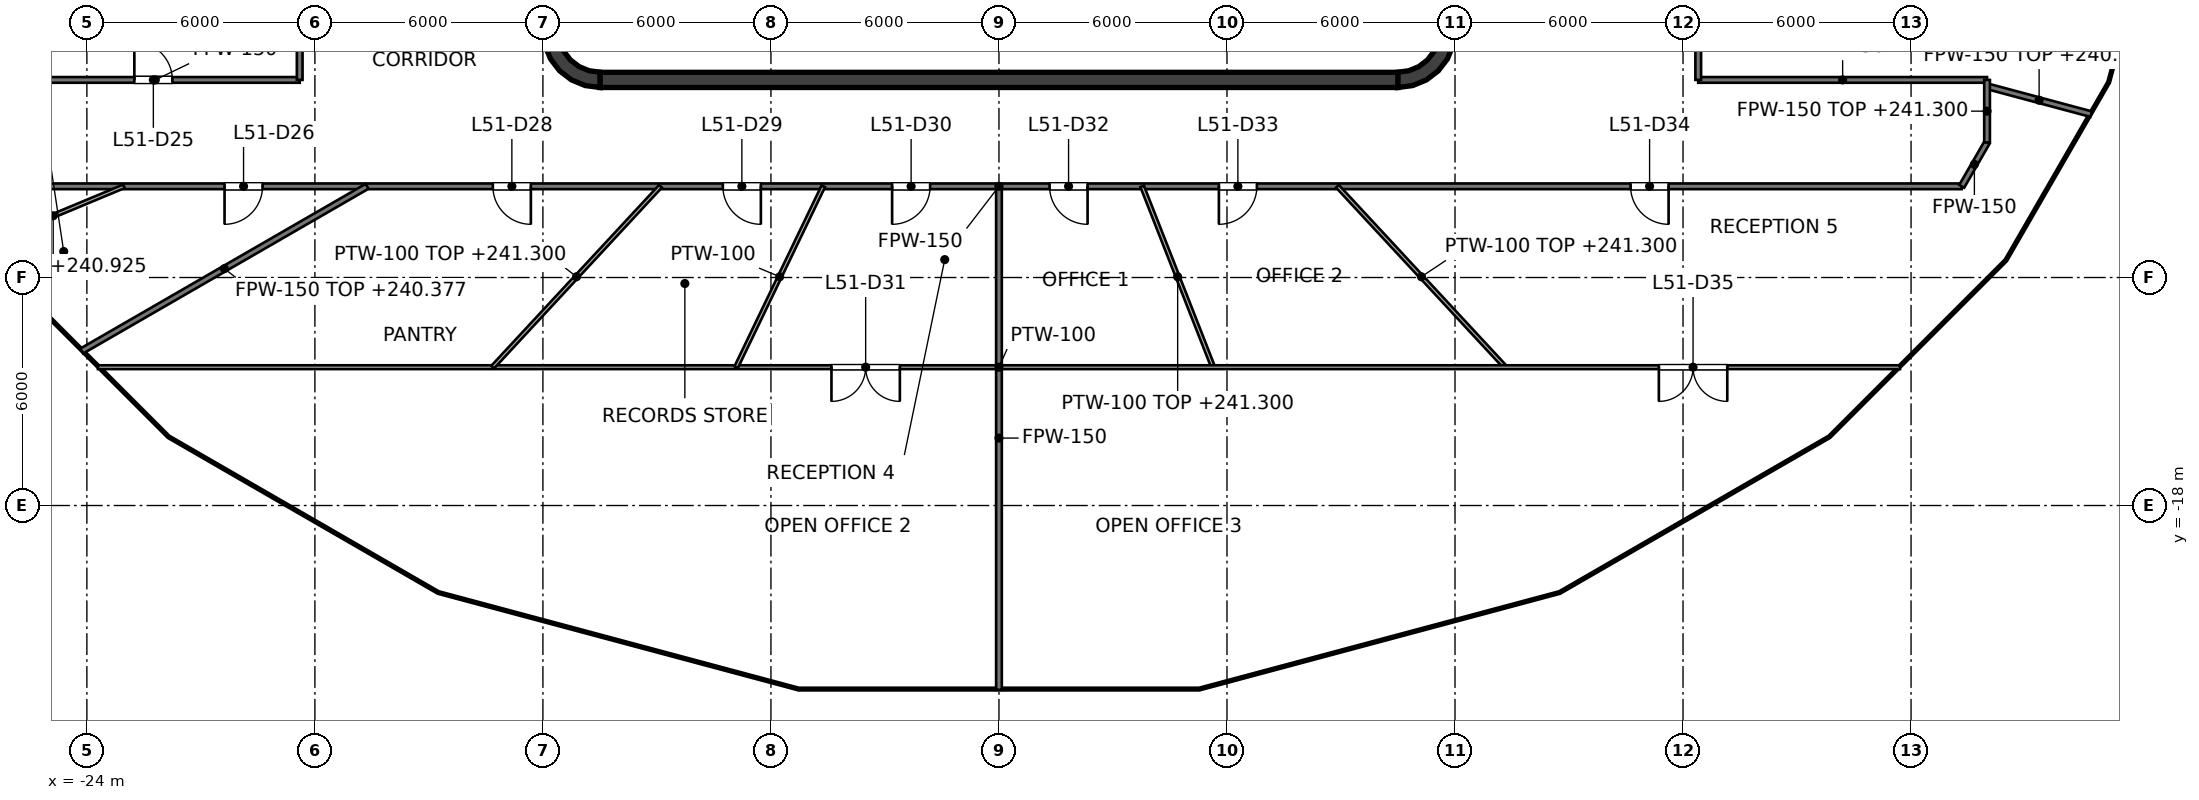
"""IFC4 building model, lengths in metres.
Left out: names, types, materials, properties, quantities, classifications, styles, units other than length and angle.
Written with IfcOpenShell. Run it as: python <this file> out.ifc"""

import sys

from ifc_helpers import new_model, si_unit, direction, frame, frame_2d, origin, place, context, subcontext, project, spatial, polyline, rectangle, outline, extrude, element, fill, save


model = new_model("IFC4")
c1 = context("Model", 3, precision=1e-05, world=origin(), true_north=direction((0.0, 1.0)))
c2 = subcontext(c1, "Body", "Model", "MODEL_VIEW")
j1 = project(units=[si_unit("LENGTHUNIT", "METRE"), si_unit("PLANEANGLEUNIT", "RADIAN")], contexts=[c1])
p1 = place(None, origin())
s1 = spatial("IfcSite", under=j1, at=p1, CompositionType="ELEMENT")
p2 = place(p1, origin())
s2 = spatial("IfcBuilding", under=s1, at=p2, CompositionType="ELEMENT")
p3 = place(p2, frame((0.0, 0.0, 237.6)))
s3 = spatial("IfcBuildingStorey", under=s2, at=p3, CompositionType="ELEMENT", Elevation=237.6)
p4 = place(p3, frame((-10.5, -6.8, 0.0), z_axis=(0.0, 0.0, 1.0), x_axis=(1.0, 0.0, 0.0)))
e1 = element("IfcWall", 1, at=p4, inside=s3, PredefinedType="SHEAR", context=c2, shape_type="SweptSolid", body=[
    extrude(rectangle(XDim=21.0, YDim=0.4, at=frame_2d((10.5, 0.0))), origin(), (0.0, 0.0, 1.0), 4.0),
])
p5 = place(p3, origin())
e2 = element("IfcWall", 2, at=p5, inside=s3, PredefinedType="SHEAR", context=c2, shape_type="SweptSolid", body=[
    extrude(outline(polyline([(-10.5, -7.0), (-10.5, -6.596), (-10.784, -6.559), (-11.048, -6.45), (-11.275, -6.275), (-11.45, -6.048), (-11.559, -5.784), (-11.596, -5.5), (-12.0, -5.5), (-11.949, -5.888), (-11.799, -6.25), (-11.561, -6.561), (-11.25, -6.799), (-10.888, -6.949), (-10.5, -7.0)])), origin(), (0.0, 0.0, 1.0), 4.0),
])
e3 = element("IfcWall", 3, at=p5, inside=s3, PredefinedType="SHEAR", context=c2, shape_type="SweptSolid", body=[
    extrude(outline(polyline([(12.0, -5.5), (11.596, -5.5), (11.559, -5.784), (11.45, -6.048), (11.275, -6.275), (11.048, -6.45), (10.784, -6.559), (10.5, -6.596), (10.5, -7.0), (10.888, -6.949), (11.25, -6.799), (11.561, -6.561), (11.799, -6.25), (11.949, -5.888), (12.0, -5.5)])), origin(), (0.0, 0.0, 1.0), 4.0),
])
p6 = place(p3, frame((0.3, -6.6, 0.0), z_axis=(0.0, 0.0, 1.0), x_axis=(0.0, 1.0, 0.0)))
e4 = element("IfcWall", 4, at=p6, inside=s3, PredefinedType="PARTITIONING", context=c2, shape_type="SweptSolid", body=[
    extrude(rectangle(XDim=2.5, YDim=0.15, at=frame_2d((1.25, 0.0))), origin(), (0.0, 0.0, 1.0), 3.7),
])
p7 = place(p6, frame((0.8, 0.0, 0.0)))
e5 = element("IfcOpeningElement", 5, at=p7, cuts=e4, PredefinedType="OPENING", context=c2, shape_type="SweptSolid", body=[
    extrude(rectangle(XDim=0.9, YDim=2.1, at=frame_2d((0.45, 1.05))), frame((0.0, 0.075, 0.0), z_axis=(0.0, -1.0, 0.0), x_axis=(1.0, 0.0, 0.0)), (0.0, 0.0, 1.0), 0.15),
])
p8 = place(p3, frame((9.0, -6.6, 0.0), z_axis=(0.0, 0.0, 1.0), x_axis=(0.0, 1.0, 0.0)))
e6 = element("IfcWall", 6, at=p8, inside=s3, PredefinedType="SOLIDWALL", context=c2, shape_type="SweptSolid", body=[
    extrude(rectangle(XDim=2.5, YDim=0.25, at=frame_2d((1.25, 0.0))), origin(), (0.0, 0.0, 1.0), 3.85),
])
p9 = place(p8, frame((0.65, 0.0, 0.0)))
e7 = element("IfcOpeningElement", 7, at=p9, cuts=e6, PredefinedType="OPENING", context=c2, shape_type="SweptSolid", body=[
    extrude(rectangle(XDim=1.2, YDim=2.1, at=frame_2d((0.6, 1.05))), frame((0.0, 0.125, 0.0), z_axis=(0.0, -1.0, 0.0), x_axis=(1.0, 0.0, 0.0)), (0.0, 0.0, 1.0), 0.25),
])
p10 = place(p3, frame((-9.0, -6.6, 0.0), z_axis=(0.0, 0.0, 1.0), x_axis=(0.0, 1.0, 0.0)))
e8 = element("IfcWall", 8, at=p10, inside=s3, PredefinedType="PARTITIONING", context=c2, shape_type="SweptSolid", body=[
    extrude(rectangle(XDim=2.5, YDim=0.25, at=frame_2d((1.25, 0.0))), origin(), (0.0, 0.0, 1.0), 3.7),
])
p11 = place(p10, frame((0.75, 0.0, 0.0)))
e9 = element("IfcOpeningElement", 9, at=p11, cuts=e8, PredefinedType="OPENING", context=c2, shape_type="SweptSolid", body=[
    extrude(rectangle(XDim=1.0, YDim=2.1, at=frame_2d((0.5, 1.05))), frame((0.0, 0.125, 0.0), z_axis=(0.0, -1.0, 0.0), x_axis=(1.0, 0.0, 0.0)), (0.0, 0.0, 1.0), 0.25),
])
p12 = place(p3, frame((3.15, -6.6, 0.0), z_axis=(0.0, 0.0, 1.0), x_axis=(0.0, 1.0, 0.0)))
e10 = element("IfcWall", 10, at=p12, inside=s3, PredefinedType="SOLIDWALL", context=c2, shape_type="SweptSolid", body=[
    extrude(rectangle(XDim=2.5, YDim=0.25, at=frame_2d((1.25, 0.0))), origin(), (0.0, 0.0, 1.0), 3.85),
])
p13 = place(p3, frame((-2.9, -6.6, 0.0), z_axis=(0.0, 0.0, 1.0), x_axis=(0.0, 1.0, 0.0)))
e11 = element("IfcWall", 11, at=p13, inside=s3, PredefinedType="PARTITIONING", context=c2, shape_type="SweptSolid", body=[
    extrude(rectangle(XDim=2.5, YDim=0.25, at=frame_2d((1.25, 0.0))), origin(), (0.0, 0.0, 1.0), 3.7),
])
p14 = place(p13, frame((0.8, 0.0, 0.0)))
e12 = element("IfcOpeningElement", 12, at=p14, cuts=e11, PredefinedType="OPENING", context=c2, shape_type="SweptSolid", body=[
    extrude(rectangle(XDim=0.9, YDim=2.1, at=frame_2d((0.45, 1.05))), frame((0.0, 0.125, 0.0), z_axis=(0.0, -1.0, 0.0), x_axis=(1.0, 0.0, 0.0)), (0.0, 0.0, 1.0), 0.25),
])
p15 = place(p3, frame((26.0, -6.967, 0.0), z_axis=(0.0, 0.0, 1.0), x_axis=(0.965928451997, -0.258809245628, 0.0)))
e13 = element("IfcWall", 13, at=p15, inside=s3, PredefinedType="PARTITIONING", context=c2, shape_type="SweptSolid", body=[
    extrude(rectangle(XDim=2.836, YDim=0.15, at=frame_2d((1.418, 0.0))), origin(), (0.0, 0.0, 1.0), 3.325),
])
p16 = place(p3, frame((-25.333, -9.6, 0.0), z_axis=(0.0, 0.0, 1.0), x_axis=(1.0, 0.0, 0.0)))
e14 = element("IfcWall", 14, at=p16, inside=s3, PredefinedType="PARTITIONING", context=c2, shape_type="SweptSolid", body=[
    extrude(rectangle(XDim=50.666, YDim=0.15, at=frame_2d((25.333, 0.0))), origin(), (0.0, 0.0, 1.0), 2.768),
])
p17 = place(p16, frame((4.956, 0.0, 0.0)))
e15 = element("IfcOpeningElement", 15, at=p17, cuts=e14, PredefinedType="OPENING", context=c2, shape_type="SweptSolid", body=[
    extrude(rectangle(XDim=1.0, YDim=2.1, at=frame_2d((0.5, 1.05))), frame((0.0, 0.075, 0.0), z_axis=(0.0, -1.0, 0.0), x_axis=(1.0, 0.0, 0.0)), (0.0, 0.0, 1.0), 0.15),
])
p18 = place(p16, frame((12.016, 0.0, 0.0)))
e16 = element("IfcOpeningElement", 16, at=p18, cuts=e14, PredefinedType="OPENING", context=c2, shape_type="SweptSolid", body=[
    extrude(rectangle(XDim=1.0, YDim=2.1, at=frame_2d((0.5, 1.05))), frame((0.0, 0.075, 0.0), z_axis=(0.0, -1.0, 0.0), x_axis=(1.0, 0.0, 0.0)), (0.0, 0.0, 1.0), 0.15),
])
p19 = place(p16, frame((18.068, 0.0, 0.0)))
e17 = element("IfcOpeningElement", 17, at=p19, cuts=e14, PredefinedType="OPENING", context=c2, shape_type="SweptSolid", body=[
    extrude(rectangle(XDim=1.0, YDim=2.1, at=frame_2d((0.5, 1.05))), frame((0.0, 0.075, 0.0), z_axis=(0.0, -1.0, 0.0), x_axis=(1.0, 0.0, 0.0)), (0.0, 0.0, 1.0), 0.15),
])
p20 = place(p16, frame((22.521, 0.0, 0.0)))
e18 = element("IfcOpeningElement", 18, at=p20, cuts=e14, PredefinedType="OPENING", context=c2, shape_type="SweptSolid", body=[
    extrude(rectangle(XDim=1.0, YDim=2.1, at=frame_2d((0.5, 1.05))), frame((0.0, 0.075, 0.0), z_axis=(0.0, -1.0, 0.0), x_axis=(1.0, 0.0, 0.0)), (0.0, 0.0, 1.0), 0.15),
])
p21 = place(p16, frame((26.665, 0.0, 0.0)))
e19 = element("IfcOpeningElement", 19, at=p21, cuts=e14, PredefinedType="OPENING", context=c2, shape_type="SweptSolid", body=[
    extrude(rectangle(XDim=1.0, YDim=2.1, at=frame_2d((0.5, 1.05))), frame((0.0, 0.075, 0.0), z_axis=(0.0, -1.0, 0.0), x_axis=(1.0, 0.0, 0.0)), (0.0, 0.0, 1.0), 0.15),
])
p22 = place(p16, frame((31.12, 0.0, 0.0)))
e20 = element("IfcOpeningElement", 20, at=p22, cuts=e14, PredefinedType="OPENING", context=c2, shape_type="SweptSolid", body=[
    extrude(rectangle(XDim=1.0, YDim=2.1, at=frame_2d((0.5, 1.05))), frame((0.0, 0.075, 0.0), z_axis=(0.0, -1.0, 0.0), x_axis=(1.0, 0.0, 0.0)), (0.0, 0.0, 1.0), 0.15),
])
p23 = place(p16, frame((41.953, 0.0, 0.0)))
e21 = element("IfcOpeningElement", 21, at=p23, cuts=e14, PredefinedType="OPENING", context=c2, shape_type="SweptSolid", body=[
    extrude(rectangle(XDim=1.0, YDim=2.1, at=frame_2d((0.5, 1.05))), frame((0.0, 0.075, 0.0), z_axis=(0.0, -1.0, 0.0), x_axis=(1.0, 0.0, 0.0)), (0.0, 0.0, 1.0), 0.15),
])
p24 = place(p3, frame((-26.0, -6.8, 0.0), z_axis=(0.0, 0.0, 1.0), x_axis=(1.0, 0.0, 0.0)))
e22 = element("IfcWall", 22, at=p24, inside=s3, PredefinedType="PARTITIONING", context=c2, shape_type="SweptSolid", body=[
    extrude(rectangle(XDim=7.6, YDim=0.15, at=frame_2d((3.8, 0.0))), origin(), (0.0, 0.0, 1.0), 2.768),
])
p25 = place(p24, frame((3.249, 0.0, 0.0)))
e23 = element("IfcOpeningElement", 23, at=p25, cuts=e22, PredefinedType="OPENING", context=c2, shape_type="SweptSolid", body=[
    extrude(rectangle(XDim=1.0, YDim=2.1, at=frame_2d((0.5, 1.05))), frame((0.0, 0.075, 0.0), z_axis=(0.0, -1.0, 0.0), x_axis=(1.0, 0.0, 0.0)), (0.0, 0.0, 1.0), 0.15),
])
p26 = place(p3, frame((18.4, -6.8, 0.0), z_axis=(0.0, 0.0, 1.0), x_axis=(1.0, 0.0, 0.0)))
e24 = element("IfcWall", 24, at=p26, inside=s3, PredefinedType="PARTITIONING", context=c2, shape_type="SweptSolid", body=[
    extrude(rectangle(XDim=7.6, YDim=0.15, at=frame_2d((3.8, 0.0))), origin(), (0.0, 0.0, 1.0), 2.768),
])
p27 = place(p3, frame((-24.135, -13.935, 0.0), z_axis=(0.0, 0.0, 1.0), x_axis=(0.866016292776, 0.500015780397, 0.0)))
e25 = element("IfcWall", 25, at=p27, inside=s3, PredefinedType="PARTITIONING", context=c2, shape_type="SweptSolid", body=[
    extrude(rectangle(XDim=8.67, YDim=0.15, at=frame_2d((4.335, 0.0))), origin(), (0.0, 0.0, 1.0), 2.777),
])
p28 = place(p3, frame((25.333, -9.6, 0.0), z_axis=(0.0, 0.0, 1.0), x_axis=(0.500076310463, 0.865981341435, 0.0)))
e26 = element("IfcWall", 26, at=p28, inside=s3, PredefinedType="PARTITIONING", context=c2, shape_type="SweptSolid", body=[
    extrude(rectangle(XDim=1.334, YDim=0.15, at=frame_2d((0.667, 0.0))), origin(), (0.0, 0.0, 1.0), 2.768),
])
p29 = place(p3, frame((26.0, -8.445, 0.0), z_axis=(0.0, 0.0, 1.0), x_axis=(0.0, 1.0, 0.0)))
e27 = element("IfcWall", 27, at=p29, inside=s3, PredefinedType="PARTITIONING", context=c2, shape_type="SweptSolid", body=[
    extrude(rectangle(XDim=1.645, YDim=0.15, at=frame_2d((0.823, 0.0))), origin(), (0.0, 0.0, 1.0), 3.7),
])
p30 = place(p3, frame((18.4, -6.8, 0.0), z_axis=(0.0, 0.0, 1.0), x_axis=(0.0, 1.0, 0.0)))
e28 = element("IfcWall", 28, at=p30, inside=s3, PredefinedType="PARTITIONING", context=c2, shape_type="SweptSolid", body=[
    extrude(rectangle(XDim=13.6, YDim=0.15, at=frame_2d((6.8, 0.0))), origin(), (0.0, 0.0, 1.0), 2.768),
])
p31 = place(p30, frame((6.2, 0.0, 0.0)))
e29 = element("IfcOpeningElement", 29, at=p31, cuts=e28, PredefinedType="OPENING", context=c2, shape_type="SweptSolid", body=[
    extrude(rectangle(XDim=1.2, YDim=2.1, at=frame_2d((0.6, 1.05))), frame((0.0, 0.075, 0.0), z_axis=(0.0, -1.0, 0.0), x_axis=(1.0, 0.0, 0.0)), (0.0, 0.0, 1.0), 0.15),
])
p32 = place(p3, frame((0.0, -22.85, 0.0), z_axis=(0.0, 0.0, 1.0), x_axis=(0.0, 1.0, 0.0)))
e30 = element("IfcWall", 30, at=p32, inside=s3, PredefinedType="PARTITIONING", context=c2, shape_type="SweptSolid", body=[
    extrude(rectangle(XDim=13.25, YDim=0.15, at=frame_2d((6.625, 0.0))), origin(), (0.0, 0.0, 1.0), 2.768),
])
p33 = place(p3, frame((-18.4, -6.8, 0.0), z_axis=(0.0, 0.0, 1.0), x_axis=(0.0, 1.0, 0.0)))
e31 = element("IfcWall", 31, at=p33, inside=s3, PredefinedType="PARTITIONING", context=c2, shape_type="SweptSolid", body=[
    extrude(rectangle(XDim=13.6, YDim=0.15, at=frame_2d((6.8, 0.0))), origin(), (0.0, 0.0, 1.0), 2.768),
])
p34 = place(p3, frame((3.768, -9.6, 0.0), z_axis=(0.0, 0.0, 1.0), x_axis=(0.365299294679, -0.93089012526, 0.0)))
e32 = element("IfcWall", 32, at=p34, inside=s3, PredefinedType="PARTITIONING", context=c2, shape_type="SweptSolid", body=[
    extrude(rectangle(XDim=5.113, YDim=0.1, at=frame_2d((2.557, 0.0))), origin(), (0.0, 0.0, 1.0), 3.7),
])
p35 = place(p3, frame((8.907, -9.6, 0.0), z_axis=(0.0, 0.0, 1.0), x_axis=(0.680201581888, -0.733025107344, 0.0)))
e33 = element("IfcWall", 33, at=p35, inside=s3, PredefinedType="PARTITIONING", context=c2, shape_type="SweptSolid", body=[
    extrude(rectangle(XDim=6.494, YDim=0.1, at=frame_2d((3.247, 0.0))), origin(), (0.0, 0.0, 1.0), 3.7),
])
p36 = place(p3, frame((-23.71, -14.36, 0.0), z_axis=(0.0, 0.0, 1.0), x_axis=(1.0, 0.0, 0.0)))
e34 = element("IfcWall", 34, at=p36, inside=s3, PredefinedType="PARTITIONING", context=c2, shape_type="SweptSolid", body=[
    extrude(rectangle(XDim=47.42, YDim=0.1, at=frame_2d((23.71, 0.0))), origin(), (0.0, 0.0, 1.0), 2.768),
])
p37 = place(p36, frame((19.302, 0.0, 0.0)))
e35 = element("IfcOpeningElement", 35, at=p37, cuts=e34, PredefinedType="OPENING", context=c2, shape_type="SweptSolid", body=[
    extrude(rectangle(XDim=1.8, YDim=2.1, at=frame_2d((0.9, 1.05))), frame((0.0, 0.05, 0.0), z_axis=(0.0, -1.0, 0.0), x_axis=(1.0, 0.0, 0.0)), (0.0, 0.0, 1.0), 0.1),
])
p38 = place(p36, frame((41.074, 0.0, 0.0)))
e36 = element("IfcOpeningElement", 36, at=p38, cuts=e34, PredefinedType="OPENING", context=c2, shape_type="SweptSolid", body=[
    extrude(rectangle(XDim=1.8, YDim=2.1, at=frame_2d((0.9, 1.05))), frame((0.0, 0.05, 0.0), z_axis=(0.0, -1.0, 0.0), x_axis=(1.0, 0.0, 0.0)), (0.0, 0.0, 1.0), 0.1),
])
p39 = place(p3, frame((-29.149, -6.991, 0.0), z_axis=(0.0, 0.0, 1.0), x_axis=(0.97242598182, 0.233211727583, 0.0)))
e37 = element("IfcWall", 37, at=p39, inside=s3, PredefinedType="PARTITIONING", context=c2, shape_type="SweptSolid", body=[
    extrude(rectangle(XDim=11.054, YDim=0.1, at=frame_2d((5.527, 0.0))), origin(), (0.0, 0.0, 1.0), 2.768),
])
p40 = place(p3, frame((-26.747, -11.152, 0.0), z_axis=(0.0, 0.0, 1.0), x_axis=(0.922980174508, 0.384847498973, 0.0)))
e38 = element("IfcWall", 38, at=p40, inside=s3, PredefinedType="PARTITIONING", context=c2, shape_type="SweptSolid", body=[
    extrude(rectangle(XDim=4.033, YDim=0.1, at=frame_2d((2.016, 0.0))), origin(), (0.0, 0.0, 1.0), 3.325),
])
p41 = place(p3, frame((-13.324, -14.36, 0.0), z_axis=(0.0, 0.0, 1.0), x_axis=(0.680201581888, 0.733025107344, 0.0)))
e39 = element("IfcWall", 39, at=p41, inside=s3, PredefinedType="PARTITIONING", context=c2, shape_type="SweptSolid", body=[
    extrude(rectangle(XDim=6.494, YDim=0.1, at=frame_2d((3.247, 0.0))), origin(), (0.0, 0.0, 1.0), 3.7),
])
p42 = place(p3, frame((-6.915, -14.36, 0.0), z_axis=(0.0, 0.0, 1.0), x_axis=(0.433836460285, 0.90099163466, 0.0)))
e40 = element("IfcWall", 40, at=p42, inside=s3, PredefinedType="PARTITIONING", context=c2, shape_type="SweptSolid", body=[
    extrude(rectangle(XDim=5.283, YDim=0.1, at=frame_2d((2.642, 0.0))), origin(), (0.0, 0.0, 1.0), 2.768),
])
p43 = place(p25, origin())
e41 = element("IfcDoor", 41, at=p43, inside=s3, OperationType="SINGLE_SWING_LEFT", PredefinedType="DOOR", context=c2, shape_type="SweptSolid", body=[
    extrude(rectangle(XDim=1.0, YDim=2.1, at=frame_2d((0.5, 1.05))), frame((0.0, 0.025, 0.0), z_axis=(0.0, -1.0, 0.0), x_axis=(1.0, 0.0, 0.0)), (0.0, 0.0, 1.0), 0.05),
])
fill(e23, e41)
p44 = place(p17, origin())
e42 = element("IfcDoor", 42, at=p44, inside=s3, OperationType="SINGLE_SWING_LEFT", PredefinedType="DOOR", context=c2, shape_type="SweptSolid", body=[
    extrude(rectangle(XDim=1.0, YDim=2.1, at=frame_2d((0.5, 1.05))), frame((0.0, 0.025, 0.0), z_axis=(0.0, -1.0, 0.0), x_axis=(1.0, 0.0, 0.0)), (0.0, 0.0, 1.0), 0.05),
])
fill(e15, e42)
p45 = place(p18, origin())
e43 = element("IfcDoor", 43, at=p45, inside=s3, OperationType="SINGLE_SWING_RIGHT", PredefinedType="DOOR", context=c2, shape_type="SweptSolid", body=[
    extrude(rectangle(XDim=1.0, YDim=2.1, at=frame_2d((0.5, 1.05))), frame((0.0, 0.025, 0.0), z_axis=(0.0, -1.0, 0.0), x_axis=(1.0, 0.0, 0.0)), (0.0, 0.0, 1.0), 0.05),
])
fill(e16, e43)
p46 = place(p19, origin())
e44 = element("IfcDoor", 44, at=p46, inside=s3, OperationType="SINGLE_SWING_RIGHT", PredefinedType="DOOR", context=c2, shape_type="SweptSolid", body=[
    extrude(rectangle(XDim=1.0, YDim=2.1, at=frame_2d((0.5, 1.05))), frame((0.0, 0.025, 0.0), z_axis=(0.0, -1.0, 0.0), x_axis=(1.0, 0.0, 0.0)), (0.0, 0.0, 1.0), 0.05),
])
fill(e17, e44)
p47 = place(p20, origin())
e45 = element("IfcDoor", 45, at=p47, inside=s3, OperationType="SINGLE_SWING_LEFT", PredefinedType="DOOR", context=c2, shape_type="SweptSolid", body=[
    extrude(rectangle(XDim=1.0, YDim=2.1, at=frame_2d((0.5, 1.05))), frame((0.0, 0.025, 0.0), z_axis=(0.0, -1.0, 0.0), x_axis=(1.0, 0.0, 0.0)), (0.0, 0.0, 1.0), 0.05),
])
fill(e18, e45)
p48 = place(p37, origin())
e46 = element("IfcDoor", 46, at=p48, inside=s3, OperationType="DOUBLE_DOOR_SINGLE_SWING", PredefinedType="DOOR", context=c2, shape_type="SweptSolid", body=[
    extrude(rectangle(XDim=1.8, YDim=2.1, at=frame_2d((0.9, 1.05))), frame((0.0, 0.025, 0.0), z_axis=(0.0, -1.0, 0.0), x_axis=(1.0, 0.0, 0.0)), (0.0, 0.0, 1.0), 0.05),
])
fill(e35, e46)
p49 = place(p21, origin())
e47 = element("IfcDoor", 47, at=p49, inside=s3, OperationType="SINGLE_SWING_RIGHT", PredefinedType="DOOR", context=c2, shape_type="SweptSolid", body=[
    extrude(rectangle(XDim=1.0, YDim=2.1, at=frame_2d((0.5, 1.05))), frame((0.0, 0.025, 0.0), z_axis=(0.0, -1.0, 0.0), x_axis=(1.0, 0.0, 0.0)), (0.0, 0.0, 1.0), 0.05),
])
fill(e19, e47)
p50 = place(p22, origin())
e48 = element("IfcDoor", 48, at=p50, inside=s3, OperationType="SINGLE_SWING_LEFT", PredefinedType="DOOR", context=c2, shape_type="SweptSolid", body=[
    extrude(rectangle(XDim=1.0, YDim=2.1, at=frame_2d((0.5, 1.05))), frame((0.0, 0.025, 0.0), z_axis=(0.0, -1.0, 0.0), x_axis=(1.0, 0.0, 0.0)), (0.0, 0.0, 1.0), 0.05),
])
fill(e20, e48)
p51 = place(p23, origin())
e49 = element("IfcDoor", 49, at=p51, inside=s3, OperationType="SINGLE_SWING_RIGHT", PredefinedType="DOOR", context=c2, shape_type="SweptSolid", body=[
    extrude(rectangle(XDim=1.0, YDim=2.1, at=frame_2d((0.5, 1.05))), frame((0.0, 0.025, 0.0), z_axis=(0.0, -1.0, 0.0), x_axis=(1.0, 0.0, 0.0)), (0.0, 0.0, 1.0), 0.05),
])
fill(e21, e49)
p52 = place(p38, origin())
e50 = element("IfcDoor", 50, at=p52, inside=s3, OperationType="DOUBLE_DOOR_SINGLE_SWING", PredefinedType="DOOR", context=c2, shape_type="SweptSolid", body=[
    extrude(rectangle(XDim=1.8, YDim=2.1, at=frame_2d((0.9, 1.05))), frame((0.0, 0.025, 0.0), z_axis=(0.0, -1.0, 0.0), x_axis=(1.0, 0.0, 0.0)), (0.0, 0.0, 1.0), 0.05),
])
fill(e36, e50)
save(model, sys.argv[1])
